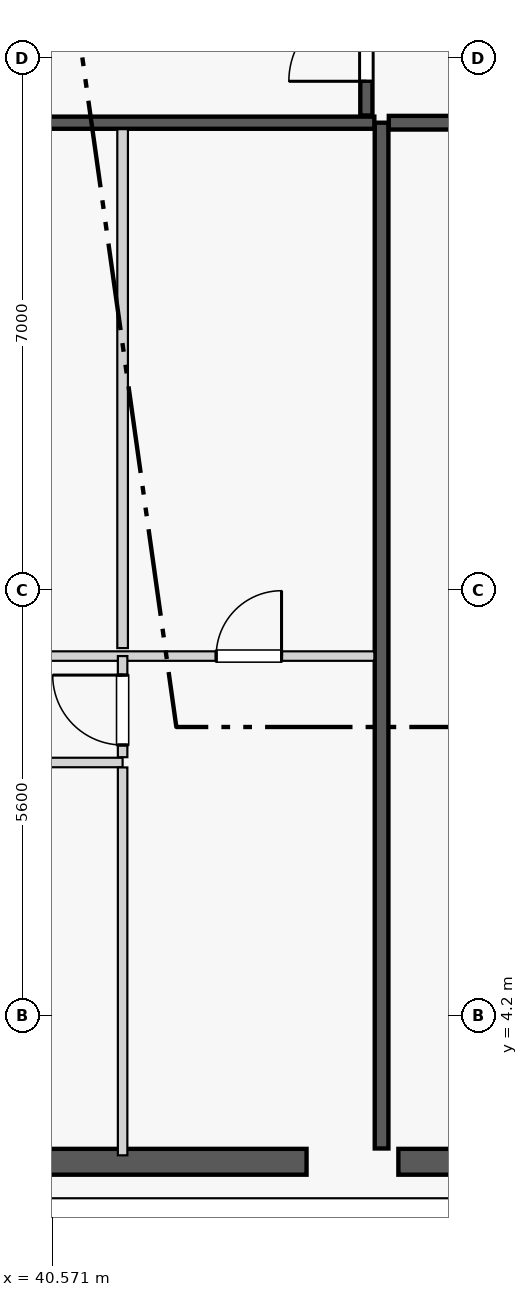
"""IFC4 building model, lengths in metres.
Left out: names, types, materials, properties, quantities, classifications, styles, units other than length and angle.
Written with IfcOpenShell. Run it as: python <this file> out.ifc"""

import sys

from ifc_helpers import new_model, si_unit, direction, frame, frame_2d, origin, origin_2d, place, context, subcontext, project, spatial, rectangle, extrude, element, fill, save


model = new_model("IFC4")
c1 = context("Model", 3, precision=1e-05, world=origin(), true_north=direction((0.0, 1.0)))
c2 = subcontext(c1, "Body", "Model", "MODEL_VIEW")
j1 = project(units=[si_unit("LENGTHUNIT", "METRE"), si_unit("PLANEANGLEUNIT", "RADIAN")], contexts=[c1])
p1 = place(None, origin())
s1 = spatial("IfcSite", under=j1, at=p1, CompositionType="ELEMENT")
p2 = place(p1, origin())
s2 = spatial("IfcBuilding", under=s1, at=p2, CompositionType="ELEMENT")
p3 = place(p2, frame((0.0, 0.0, 35.55)))
s3 = spatial("IfcBuildingStorey", under=s2, at=p3, CompositionType="ELEMENT", Elevation=35.55)
p4 = place(p3, frame((44.517, 2.289, 0.0), z_axis=(0.0, 0.0, 1.0), x_axis=(1.0, 0.0, 0.0)))
e1 = element("IfcColumn", 1, at=p4, inside=s3, PredefinedType="COLUMN", context=c2, shape_type="SweptSolid", body=[
    extrude(rectangle(XDim=1.2, YDim=1.2, at=origin_2d()), origin(), (0.0, 0.0, 1.0), 3.55),
])
p5 = place(p3, frame((37.126, 2.28, 0.0), z_axis=(0.0, 0.0, 1.0), x_axis=(1.0, 0.0, 0.0)))
e2 = element("IfcWall", 2, at=p5, inside=s3, PredefinedType="STANDARD", context=c2, shape_type="SweptSolid", body=[
    extrude(rectangle(XDim=6.787, YDim=0.34, at=frame_2d((3.394, 0.0))), origin(), (0.0, 0.0, 1.0), 2.787),
])
p6 = place(p5, frame((2.213, 0.0, 0.75)))
e3 = element("IfcOpeningElement", 3, at=p6, cuts=e2, PredefinedType="OPENING", context=c2, shape_type="SweptSolid", body=[
    extrude(rectangle(XDim=1.1, YDim=1.887, at=frame_2d((0.55, 0.943))), frame((0.0, 0.18, 0.0), z_axis=(0.0, -1.0, 0.0), x_axis=(1.0, 0.0, 0.0)), (0.0, 0.0, 1.0), 0.36),
])
p7 = place(p5, frame((5.083, 0.0, 0.75)))
e4 = element("IfcOpeningElement", 4, at=p7, cuts=e2, PredefinedType="OPENING", context=c2, shape_type="SweptSolid", body=[
    extrude(rectangle(XDim=1.1, YDim=1.887, at=frame_2d((0.55, 0.943))), frame((0.0, 0.18, 0.0), z_axis=(0.0, -1.0, 0.0), x_axis=(1.0, 0.0, 0.0)), (0.0, 0.0, 1.0), 0.36),
])
p8 = place(p5, frame((0.21, 0.0, 0.75)))
e5 = element("IfcOpeningElement", 5, at=p8, cuts=e2, PredefinedType="OPENING", context=c2, shape_type="SweptSolid", body=[
    extrude(rectangle(XDim=0.716, YDim=1.887, at=frame_2d((0.358, 0.943))), frame((0.0, 0.18, 0.0), z_axis=(0.0, -1.0, 0.0), x_axis=(1.0, 0.0, 0.0)), (0.0, 0.0, 1.0), 0.36),
])
p9 = place(p3, frame((45.121, 2.28, 0.0), z_axis=(0.0, 0.0, 1.0), x_axis=(1.0, 0.0, 0.0)))
e6 = element("IfcWall", 6, at=p9, inside=s3, PredefinedType="STANDARD", context=c2, shape_type="SweptSolid", body=[
    extrude(rectangle(XDim=1.245, YDim=0.34, at=frame_2d((0.623, 0.0))), origin(), (0.0, 0.0, 1.0), 3.33),
])
p10 = place(p3, frame((44.9, 2.455, 0.0), z_axis=(0.0, 0.0, 1.0), x_axis=(0.0, 1.0, 0.0)))
e7 = element("IfcWall", 7, at=p10, inside=s3, PredefinedType="PARTITIONING", context=c2, shape_type="SweptSolid", body=[
    extrude(rectangle(XDim=13.495, YDim=0.18, at=frame_2d((6.748, 0.0))), origin(), (0.0, 0.0, 1.0), 3.33),
])
p11 = place(p3, frame((28.373, 15.95, 0.0), z_axis=(0.0, 0.0, 1.0), x_axis=(1.0, 0.0, 0.0)))
e8 = element("IfcWall", 8, at=p11, inside=s3, PredefinedType="PARTITIONING", context=c2, shape_type="SweptSolid", body=[
    extrude(rectangle(XDim=16.432, YDim=0.16, at=frame_2d((8.216, 0.0))), origin(), (0.0, 0.0, 1.0), 3.33),
])
p12 = place(p11, frame((0.355, 0.0, 0.0)))
e9 = element("IfcOpeningElement", 9, at=p12, cuts=e8, PredefinedType="OPENING", context=c2, shape_type="SweptSolid", body=[
    extrude(rectangle(XDim=1.35, YDim=2.35, at=frame_2d((0.675, 1.175))), frame((0.0, 0.09, 0.0), z_axis=(0.0, -1.0, 0.0), x_axis=(1.0, 0.0, 0.0)), (0.0, 0.0, 1.0), 0.18),
])
p13 = place(p3, frame((38.285, 8.933, 0.0), z_axis=(0.0, 0.0, 1.0), x_axis=(1.0, 0.0, 0.0)))
e10 = element("IfcWall", 10, at=p13, inside=s3, PredefinedType="PARTITIONING", context=c2, shape_type="SweptSolid", body=[
    extrude(rectangle(XDim=6.52, YDim=0.125, at=frame_2d((3.26, 0.0))), origin(), (0.0, 0.0, 1.0), 3.33),
])
p14 = place(p13, frame((4.439, 0.0, 0.0)))
e11 = element("IfcOpeningElement", 11, at=p14, cuts=e10, PredefinedType="OPENING", context=c2, shape_type="SweptSolid", body=[
    extrude(rectangle(XDim=0.86, YDim=2.1, at=frame_2d((0.43, 1.05))), frame((0.0, 0.073, 0.0), z_axis=(0.0, -1.0, 0.0), x_axis=(1.0, 0.0, 0.0)), (0.0, 0.0, 1.0), 0.145),
])
p15 = place(p13, frame((0.3, 0.0, 0.0)))
e12 = element("IfcOpeningElement", 12, at=p15, cuts=e10, PredefinedType="OPENING", context=c2, shape_type="SweptSolid", body=[
    extrude(rectangle(XDim=0.88, YDim=2.15, at=frame_2d((0.44, 1.075))), frame((0.0, 0.073, 0.0), z_axis=(0.0, -1.0, 0.0), x_axis=(1.0, 0.0, 0.0)), (0.0, 0.0, 1.0), 0.145),
])
p16 = place(p3, frame((34.878, 7.533, 0.0), z_axis=(0.0, 0.0, 1.0), x_axis=(1.0, 0.0, 0.0)))
e13 = element("IfcWall", 13, at=p16, inside=s3, PredefinedType="PARTITIONING", context=c2, shape_type="SweptSolid", body=[
    extrude(rectangle(XDim=6.615, YDim=0.125, at=frame_2d((3.308, 0.0))), origin(), (0.0, 0.0, 1.0), 3.33),
])
p17 = place(p16, frame((0.35, 0.0, 0.0)))
e14 = element("IfcOpeningElement", 14, at=p17, cuts=e13, PredefinedType="OPENING", context=c2, shape_type="SweptSolid", body=[
    extrude(rectangle(XDim=0.92, YDim=2.15, at=frame_2d((0.46, 1.075))), frame((0.0, 0.073, 0.0), z_axis=(0.0, -1.0, 0.0), x_axis=(1.0, 0.0, 0.0)), (0.0, 0.0, 1.0), 0.145),
])
p18 = place(p16, frame((3.757, 0.0, 0.0)))
e15 = element("IfcOpeningElement", 15, at=p18, cuts=e13, PredefinedType="OPENING", context=c2, shape_type="SweptSolid", body=[
    extrude(rectangle(XDim=0.92, YDim=2.15, at=frame_2d((0.46, 1.075))), frame((0.0, 0.073, 0.0), z_axis=(0.0, -1.0, 0.0), x_axis=(1.0, 0.0, 0.0)), (0.0, 0.0, 1.0), 0.145),
])
p19 = place(p3, frame((41.493, 7.603, 0.0), z_axis=(0.0, 0.0, 1.0), x_axis=(0.0, 1.0, 0.0)))
e16 = element("IfcWall", 16, at=p19, inside=s3, PredefinedType="PARTITIONING", context=c2, shape_type="SweptSolid", body=[
    extrude(rectangle(XDim=1.33, YDim=0.125, at=frame_2d((0.665, 0.0))), origin(), (0.0, 0.0, 1.0), 3.33),
])
p20 = place(p19, frame((0.16, 0.0, 0.0)))
e17 = element("IfcOpeningElement", 17, at=p20, cuts=e16, PredefinedType="OPENING", context=c2, shape_type="SweptSolid", body=[
    extrude(rectangle(XDim=0.92, YDim=2.15, at=frame_2d((0.46, 1.075))), frame((0.0, 0.073, 0.0), z_axis=(0.0, -1.0, 0.0), x_axis=(1.0, 0.0, 0.0)), (0.0, 0.0, 1.0), 0.145),
])
p21 = place(p3, frame((41.493, 2.365, 0.0), z_axis=(0.0, 0.0, 1.0), x_axis=(0.0, 1.0, 0.0)))
e18 = element("IfcWall", 18, at=p21, inside=s3, PredefinedType="PARTITIONING", context=c2, shape_type="SweptSolid", body=[
    extrude(rectangle(XDim=5.103, YDim=0.125, at=frame_2d((2.552, 0.0))), origin(), (0.0, 0.0, 1.0), 3.33),
])
p22 = place(p3, frame((41.493, 9.038, 0.0), z_axis=(0.0, 0.0, 1.0), x_axis=(0.0, 1.0, 0.0)))
e19 = element("IfcWall", 19, at=p22, inside=s3, PredefinedType="PLUMBINGWALL", context=c2, shape_type="SweptSolid", body=[
    extrude(rectangle(XDim=6.827, YDim=0.14, at=frame_2d((3.414, 0.0))), origin(), (0.0, 0.0, 1.0), 3.33),
])
p23 = place(p3, frame((44.995, 15.95, 0.0), z_axis=(0.0, 0.0, 1.0), x_axis=(1.0, 0.0, 0.0)))
e20 = element("IfcWall", 20, at=p23, inside=s3, PredefinedType="PARTITIONING", context=c2, shape_type="SweptSolid", body=[
    extrude(rectangle(XDim=9.241, YDim=0.18, at=frame_2d((4.621, 0.0))), origin(), (0.0, 0.0, 1.0), 3.33),
])
p24 = place(p3, frame((44.7, 16.045, 0.0), z_axis=(0.0, 0.0, 1.0), x_axis=(0.0, 1.0, 0.0)))
e21 = element("IfcWall", 21, at=p24, inside=s3, PredefinedType="PARTITIONING", context=c2, shape_type="SweptSolid", body=[
    extrude(rectangle(XDim=19.71, YDim=0.16, at=frame_2d((9.855, 0.0))), origin(), (0.0, 0.0, 1.0), 2.7),
])
p25 = place(p24, frame((0.45, 0.0, 0.0)))
e22 = element("IfcOpeningElement", 22, at=p25, cuts=e21, PredefinedType="OPENING", context=c2, shape_type="SweptSolid", body=[
    extrude(rectangle(XDim=1.02, YDim=2.25, at=frame_2d((0.51, 1.125))), frame((0.0, 0.09, 0.0), z_axis=(0.0, -1.0, 0.0), x_axis=(1.0, 0.0, 0.0)), (0.0, 0.0, 1.0), 0.18),
])
p26 = place(p14, origin())
e23 = element("IfcDoor", 23, at=p26, inside=s3, OperationType="SINGLE_SWING_RIGHT", PredefinedType="DOOR", context=c2, shape_type="SweptSolid", body=[
    extrude(rectangle(XDim=0.86, YDim=2.1, at=frame_2d((0.43, 1.05))), frame((0.0, 0.025, 0.0), z_axis=(0.0, -1.0, 0.0), x_axis=(1.0, 0.0, 0.0)), (0.0, 0.0, 1.0), 0.05),
])
fill(e11, e23)
p27 = place(p20, origin())
e24 = element("IfcDoor", 24, at=p27, inside=s3, OperationType="SINGLE_SWING_RIGHT", PredefinedType="DOOR", context=c2, shape_type="SweptSolid", body=[
    extrude(rectangle(XDim=0.92, YDim=2.15, at=frame_2d((0.46, 1.075))), frame((0.0, 0.025, 0.0), z_axis=(0.0, -1.0, 0.0), x_axis=(1.0, 0.0, 0.0)), (0.0, 0.0, 1.0), 0.05),
])
fill(e17, e24)
p28 = place(p25, origin())
e25 = element("IfcDoor", 25, at=p28, inside=s3, OperationType="SINGLE_SWING_LEFT", PredefinedType="DOOR", context=c2, shape_type="SweptSolid", body=[
    extrude(rectangle(XDim=1.02, YDim=2.25, at=frame_2d((0.51, 1.125))), frame((0.0, 0.025, 0.0), z_axis=(0.0, -1.0, 0.0), x_axis=(1.0, 0.0, 0.0)), (0.0, 0.0, 1.0), 0.05),
])
fill(e22, e25)
p29 = place(p7, origin())
e26 = element("IfcWindow", 26, at=p29, inside=s3, PartitioningType="SINGLE_PANEL", PredefinedType="WINDOW", context=c2, shape_type="SweptSolid", body=[
    extrude(rectangle(XDim=1.1, YDim=1.887, at=frame_2d((0.55, 0.943))), frame((0.0, 0.03, 0.0), z_axis=(0.0, -1.0, 0.0), x_axis=(1.0, 0.0, 0.0)), (0.0, 0.0, 1.0), 0.06),
])
fill(e4, e26)
save(model, sys.argv[1])
